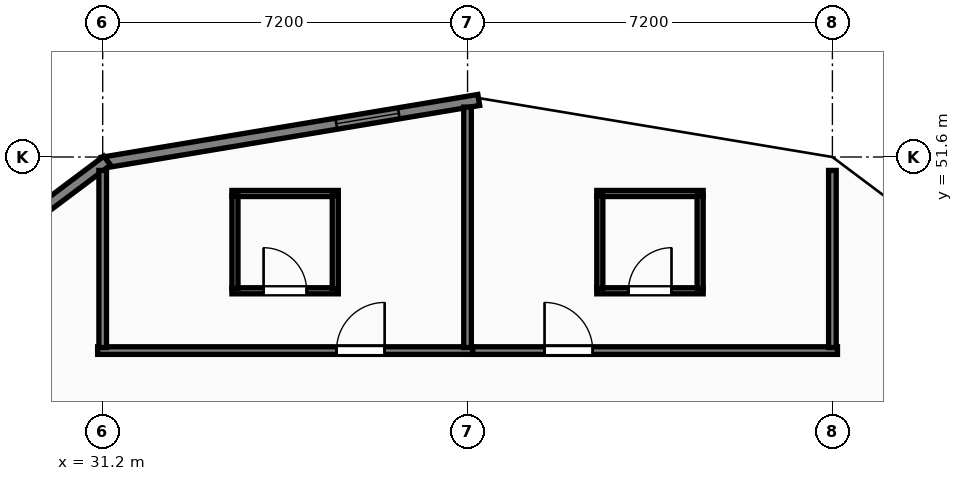
"""IFC4 building model, lengths in metres.
Left out: names, types, materials, properties, quantities, classifications, styles, units other than length and angle.
Written with IfcOpenShell. Run it as: python <this file> out.ifc"""

import sys

from ifc_helpers import new_model, si_unit, direction, frame, frame_2d, origin, origin_2d, place, context, subcontext, project, spatial, rectangle, hollow_rectangle, extrude, element, fill, save


model = new_model("IFC4")
c1 = context("Model", 3, precision=1e-05, world=origin(), true_north=direction((0.0, 1.0)))
c2 = subcontext(c1, "Body", "Model", "MODEL_VIEW")
j1 = project(units=[si_unit("LENGTHUNIT", "METRE"), si_unit("PLANEANGLEUNIT", "RADIAN")], contexts=[c1])
p1 = place(None, origin())
s1 = spatial("IfcSite", under=j1, at=p1, CompositionType="ELEMENT")
p2 = place(p1, origin())
s2 = spatial("IfcBuilding", under=s1, at=p2, CompositionType="ELEMENT")
p3 = place(p2, frame((0.0, 0.0, 235.2)))
s3 = spatial("IfcBuildingStorey", under=s2, at=p3, CompositionType="ELEMENT", Elevation=235.2)
for number, where, z_axis, x_axis in (
    (1, (31.2, 50.4, 0.0), (0.0, 0.0, 1.0), (1.0, 0.0, 0.0)),
    (2, (45.6, 50.4, 0.0), (0.0, 0.0, 1.0), (1.0, 0.0, 0.0)),
):
    element("IfcColumn", number, at=place(p3, frame(where, z_axis=z_axis, x_axis=x_axis)), inside=s3, PredefinedType="COLUMN", context=c2, shape_type="SweptSolid", body=[
        extrude(hollow_rectangle(XDim=0.8, YDim=0.8, WallThickness=0.03, at=origin_2d()), origin(), (0.0, 0.0, 1.0), 3.85),
    ])
p4 = place(p3, frame((38.4, 50.4, 0.0), z_axis=(0.0, 0.0, 1.0), x_axis=(1.0, 0.0, 0.0)))
e3 = element("IfcColumn", 3, at=p4, inside=s3, PredefinedType="COLUMN", context=c2, shape_type="SweptSolid", body=[
    extrude(hollow_rectangle(XDim=0.7, YDim=0.7, WallThickness=0.026, at=origin_2d()), origin(), (0.0, 0.0, 1.0), 3.85),
])
p5 = place(p3, frame((38.622, 52.726, 0.0), z_axis=(0.0, 0.0, 1.0), x_axis=(-0.986390420428, -0.164420006349, 0.0)))
e4 = element("IfcWall", 4, at=p5, inside=s3, PredefinedType="SOLIDWALL", context=c2, shape_type="SweptSolid", body=[
    extrude(rectangle(XDim=7.534, YDim=0.22, at=frame_2d((3.767, 0.0))), origin(), (0.0, 0.0, 1.0), 3.67),
])
p6 = place(p5, frame((1.6, 0.0, 0.85)))
e5 = element("IfcOpeningElement", 5, at=p6, cuts=e4, PredefinedType="OPENING", context=c2, shape_type="SweptSolid", body=[
    extrude(rectangle(XDim=1.25, YDim=1.95, at=frame_2d((0.625, 0.975))), frame((0.0, 0.12, 0.0), z_axis=(0.0, -1.0, 0.0), x_axis=(1.0, 0.0, 0.0)), (0.0, 0.0, 1.0), 0.24),
])
p7 = place(p3, frame((31.289, 51.529, 0.0), z_axis=(0.0, 0.0, 1.0), x_axis=(-0.800014580093, -0.599980559383, 0.0)))
e6 = element("IfcWall", 6, at=p7, inside=s3, PredefinedType="SOLIDWALL", context=c2, shape_type="SweptSolid", body=[
    extrude(rectangle(XDim=6.028, YDim=0.22, at=frame_2d((3.014, 0.0))), origin(), (0.0, 0.0, 1.0), 3.67),
])
p8 = place(p7, frame((1.6, 0.0, 0.85)))
e7 = element("IfcOpeningElement", 7, at=p8, cuts=e6, PredefinedType="OPENING", context=c2, shape_type="SweptSolid", body=[
    extrude(rectangle(XDim=1.25, YDim=1.95, at=frame_2d((0.625, 0.975))), frame((0.0, 0.12, 0.0), z_axis=(0.0, -1.0, 0.0), x_axis=(1.0, 0.0, 0.0)), (0.0, 0.0, 1.0), 0.24),
])
p9 = place(p3, frame((31.1, 47.78, 0.0), z_axis=(0.0, 0.0, 1.0), x_axis=(1.0, 0.0, 0.0)))
e8 = element("IfcWall", 8, at=p9, inside=s3, PredefinedType="PARTITIONING", context=c2, shape_type="SweptSolid", body=[
    extrude(rectangle(XDim=7.4, YDim=0.15, at=frame_2d((3.7, 0.0))), origin(), (0.0, 0.0, 1.0), 3.67),
])
p10 = place(p9, frame((4.714, 0.0, 0.0)))
e9 = element("IfcOpeningElement", 9, at=p10, cuts=e8, PredefinedType="OPENING", context=c2, shape_type="SweptSolid", body=[
    extrude(rectangle(XDim=0.95, YDim=2.15, at=frame_2d((0.475, 1.075))), frame((0.0, 0.085, 0.0), z_axis=(0.0, -1.0, 0.0), x_axis=(1.0, 0.0, 0.0)), (0.0, 0.0, 1.0), 0.17),
])
p11 = place(p3, frame((31.2, 47.84, 0.0), z_axis=(0.0, 0.0, 1.0), x_axis=(0.0, 1.0, 0.0)))
e10 = element("IfcWall", 10, at=p11, inside=s3, PredefinedType="PARTITIONING", context=c2, shape_type="SweptSolid", body=[
    extrude(rectangle(XDim=3.495, YDim=0.15, at=frame_2d((1.748, 0.0))), origin(), (0.0, 0.0, 1.0), 3.205),
])
p12 = place(p3, frame((38.4, 47.84, 0.0), z_axis=(0.0, 0.0, 1.0), x_axis=(0.0, 1.0, 0.0)))
e11 = element("IfcWall", 11, at=p12, inside=s3, PredefinedType="PARTITIONING", context=c2, shape_type="SweptSolid", body=[
    extrude(rectangle(XDim=4.745, YDim=0.15, at=frame_2d((2.373, 0.0))), origin(), (0.0, 0.0, 1.0), 3.67),
])
p13 = place(p3, frame((33.75, 50.88, 0.0), z_axis=(0.0, 0.0, 1.0), x_axis=(1.0, 0.0, 0.0)))
e12 = element("IfcWall", 12, at=p13, inside=s3, PredefinedType="PARTITIONING", context=c2, shape_type="SweptSolid", body=[
    extrude(rectangle(XDim=2.1, YDim=0.12, at=frame_2d((1.05, 0.0))), origin(), (0.0, 0.0, 1.0), 3.67),
])
p14 = place(p3, frame((33.75, 48.96, 0.0), z_axis=(0.0, 0.0, 1.0), x_axis=(1.0, 0.0, 0.0)))
e13 = element("IfcWall", 13, at=p14, inside=s3, PredefinedType="PARTITIONING", context=c2, shape_type="SweptSolid", body=[
    extrude(rectangle(XDim=2.1, YDim=0.12, at=frame_2d((1.05, 0.0))), origin(), (0.0, 0.0, 1.0), 3.67),
])
p15 = place(p14, frame((0.625, 0.0, 0.0)))
e14 = element("IfcOpeningElement", 14, at=p15, cuts=e13, PredefinedType="OPENING", context=c2, shape_type="SweptSolid", body=[
    extrude(rectangle(XDim=0.85, YDim=2.1, at=frame_2d((0.425, 1.05))), frame((0.0, 0.07, 0.0), z_axis=(0.0, -1.0, 0.0), x_axis=(1.0, 0.0, 0.0)), (0.0, 0.0, 1.0), 0.14),
])
for number, where, z_axis, x_axis in (
    (15, (33.81, 49.005, 0.0), (0.0, 0.0, 1.0), (0.0, 1.0, 0.0)),
    (16, (35.79, 49.005, 0.0), (0.0, 0.0, 1.0), (0.0, 1.0, 0.0)),
):
    element("IfcWall", number, at=place(p3, frame(where, z_axis=z_axis, x_axis=x_axis)), inside=s3, PredefinedType="PARTITIONING", context=c2, shape_type="SweptSolid", body=[
        extrude(rectangle(XDim=1.83, YDim=0.12, at=frame_2d((0.915, 0.0))), origin(), (0.0, 0.0, 1.0), 3.67),
    ])
p16 = place(p3, frame((38.502, 47.78, 0.0), z_axis=(0.0, 0.0, 1.0), x_axis=(1.0, 0.0, 0.0)))
e17 = element("IfcWall", 17, at=p16, inside=s3, PredefinedType="PARTITIONING", context=c2, shape_type="SweptSolid", body=[
    extrude(rectangle(XDim=7.198, YDim=0.15, at=frame_2d((3.599, 0.0))), origin(), (0.0, 0.0, 1.0), 3.67),
])
p17 = place(p16, frame((1.417, 0.0, 0.0)))
e18 = element("IfcOpeningElement", 18, at=p17, cuts=e17, PredefinedType="OPENING", context=c2, shape_type="SweptSolid", body=[
    extrude(rectangle(XDim=0.95, YDim=2.15, at=frame_2d((0.475, 1.075))), frame((0.0, 0.085, 0.0), z_axis=(0.0, -1.0, 0.0), x_axis=(1.0, 0.0, 0.0)), (0.0, 0.0, 1.0), 0.17),
])
p18 = place(p3, frame((45.6, 47.84, 0.0), z_axis=(0.0, 0.0, 1.0), x_axis=(0.0, 1.0, 0.0)))
e19 = element("IfcWall", 19, at=p18, inside=s3, PredefinedType="PARTITIONING", context=c2, shape_type="SweptSolid", body=[
    extrude(rectangle(XDim=3.495, YDim=0.15, at=frame_2d((1.748, 0.0))), origin(), (0.0, 0.0, 1.0), 3.205),
])
p19 = place(p3, frame((40.95, 50.88, 0.0), z_axis=(0.0, 0.0, 1.0), x_axis=(1.0, 0.0, 0.0)))
e20 = element("IfcWall", 20, at=p19, inside=s3, PredefinedType="PARTITIONING", context=c2, shape_type="SweptSolid", body=[
    extrude(rectangle(XDim=2.1, YDim=0.12, at=frame_2d((1.05, 0.0))), origin(), (0.0, 0.0, 1.0), 3.67),
])
p20 = place(p3, frame((40.95, 48.96, 0.0), z_axis=(0.0, 0.0, 1.0), x_axis=(1.0, 0.0, 0.0)))
e21 = element("IfcWall", 21, at=p20, inside=s3, PredefinedType="PARTITIONING", context=c2, shape_type="SweptSolid", body=[
    extrude(rectangle(XDim=2.1, YDim=0.12, at=frame_2d((1.05, 0.0))), origin(), (0.0, 0.0, 1.0), 3.67),
])
p21 = place(p20, frame((0.625, 0.0, 0.0)))
e22 = element("IfcOpeningElement", 22, at=p21, cuts=e21, PredefinedType="OPENING", context=c2, shape_type="SweptSolid", body=[
    extrude(rectangle(XDim=0.85, YDim=2.1, at=frame_2d((0.425, 1.05))), frame((0.0, 0.07, 0.0), z_axis=(0.0, -1.0, 0.0), x_axis=(1.0, 0.0, 0.0)), (0.0, 0.0, 1.0), 0.14),
])
for number, where, z_axis, x_axis in (
    (23, (41.01, 49.005, 0.0), (0.0, 0.0, 1.0), (0.0, 1.0, 0.0)),
    (24, (42.99, 49.005, 0.0), (0.0, 0.0, 1.0), (0.0, 1.0, 0.0)),
):
    element("IfcWall", number, at=place(p3, frame(where, z_axis=z_axis, x_axis=x_axis)), inside=s3, PredefinedType="PARTITIONING", context=c2, shape_type="SweptSolid", body=[
        extrude(rectangle(XDim=1.83, YDim=0.12, at=frame_2d((0.915, 0.0))), origin(), (0.0, 0.0, 1.0), 3.67),
    ])
p22 = place(p6, origin())
e25 = element("IfcWindow", 25, at=p22, inside=s3, PartitioningType="SINGLE_PANEL", PredefinedType="WINDOW", context=c2, shape_type="SweptSolid", body=[
    extrude(rectangle(XDim=1.25, YDim=1.95, at=frame_2d((0.625, 0.975))), frame((0.0, 0.03, 0.0), z_axis=(0.0, -1.0, 0.0), x_axis=(1.0, 0.0, 0.0)), (0.0, 0.0, 1.0), 0.06),
])
fill(e5, e25)
p23 = place(p10, origin())
e26 = element("IfcDoor", 26, at=p23, inside=s3, OperationType="SINGLE_SWING_RIGHT", PredefinedType="DOOR", context=c2, shape_type="SweptSolid", body=[
    extrude(rectangle(XDim=0.95, YDim=2.15, at=frame_2d((0.475, 1.075))), frame((0.0, 0.025, 0.0), z_axis=(0.0, -1.0, 0.0), x_axis=(1.0, 0.0, 0.0)), (0.0, 0.0, 1.0), 0.05),
])
fill(e9, e26)
p24 = place(p15, origin())
e27 = element("IfcDoor", 27, at=p24, inside=s3, OperationType="SINGLE_SWING_LEFT", PredefinedType="DOOR", context=c2, shape_type="SweptSolid", body=[
    extrude(rectangle(XDim=0.85, YDim=2.1, at=frame_2d((0.425, 1.05))), frame((0.0, 0.025, 0.0), z_axis=(0.0, -1.0, 0.0), x_axis=(1.0, 0.0, 0.0)), (0.0, 0.0, 1.0), 0.05),
])
fill(e14, e27)
p25 = place(p17, origin())
e28 = element("IfcDoor", 28, at=p25, inside=s3, OperationType="SINGLE_SWING_LEFT", PredefinedType="DOOR", context=c2, shape_type="SweptSolid", body=[
    extrude(rectangle(XDim=0.95, YDim=2.15, at=frame_2d((0.475, 1.075))), frame((0.0, 0.025, 0.0), z_axis=(0.0, -1.0, 0.0), x_axis=(1.0, 0.0, 0.0)), (0.0, 0.0, 1.0), 0.05),
])
fill(e18, e28)
p26 = place(p21, origin())
e29 = element("IfcDoor", 29, at=p26, inside=s3, OperationType="SINGLE_SWING_RIGHT", PredefinedType="DOOR", context=c2, shape_type="SweptSolid", body=[
    extrude(rectangle(XDim=0.85, YDim=2.1, at=frame_2d((0.425, 1.05))), frame((0.0, 0.025, 0.0), z_axis=(0.0, -1.0, 0.0), x_axis=(1.0, 0.0, 0.0)), (0.0, 0.0, 1.0), 0.05),
])
fill(e22, e29)
save(model, sys.argv[1])
